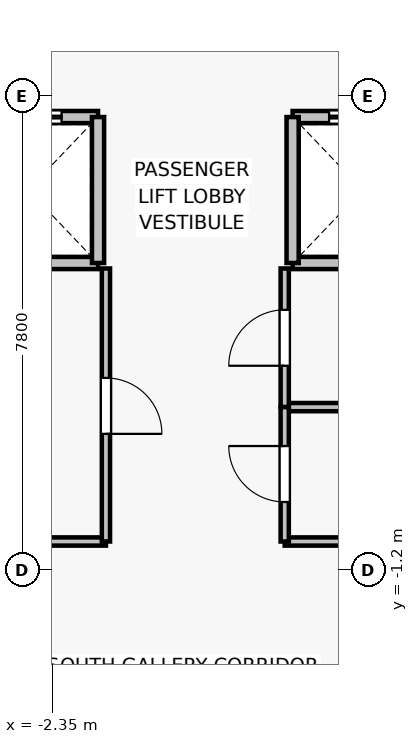
"""IFC4 building model, lengths in metres.
Left out: names, types, materials, properties, quantities, classifications, styles, units other than length and angle.
Written with IfcOpenShell. Run it as: python <this file> out.ifc"""

import sys

from ifc_helpers import new_model, si_unit, direction, frame, frame_2d, origin, place, context, subcontext, project, spatial, rectangle, extrude, source, transform, mapped, element, fill, save


model = new_model("IFC4")
c1 = context("Model", 3, precision=1e-05, world=origin(), true_north=direction((0.0, 1.0)))
c2 = subcontext(c1, "Body", "Model", "MODEL_VIEW")
j1 = project(units=[si_unit("LENGTHUNIT", "METRE"), si_unit("PLANEANGLEUNIT", "RADIAN")], contexts=[c1])
p1 = place(None, origin())
s1 = spatial("IfcSite", under=j1, at=p1, CompositionType="ELEMENT")
p2 = place(p1, origin())
s2 = spatial("IfcBuilding", under=s1, at=p2, CompositionType="ELEMENT")
p3 = place(p2, frame((0.0, 0.0, 189.1)))
s3 = spatial("IfcBuildingStorey", under=s2, at=p3, CompositionType="ELEMENT", Elevation=189.1)
p4 = place(p3, frame((-1.6, 3.85, 0.0), z_axis=(0.0, 0.0, 1.0), x_axis=(-1.0, 0.0, 0.0)))
e1 = element("IfcWall", 1, at=p4, inside=s3, PredefinedType="SOLIDWALL", context=c2, shape_type="SweptSolid", body=[
    extrude(rectangle(XDim=2.3, YDim=0.2, at=frame_2d((1.15, 0.0))), origin(), (0.0, 0.0, 1.0), 3.075),
])
p5 = place(p3, frame((-3.9, 6.25, 0.0), z_axis=(0.0, 0.0, 1.0), x_axis=(1.0, 0.0, 0.0)))
e2 = element("IfcWall", 2, at=p5, inside=s3, PredefinedType="SOLIDWALL", context=c2, shape_type="SweptSolid", body=[
    extrude(rectangle(XDim=2.3, YDim=0.2, at=frame_2d((1.15, 0.0))), origin(), (0.0, 0.0, 1.0), 3.075),
])
p6 = place(p5, frame((0.6, 0.0, 0.0)))
e3 = element("IfcOpeningElement", 3, at=p6, cuts=e2, PredefinedType="OPENING", context=c2, shape_type="SweptSolid", body=[
    extrude(rectangle(XDim=1.1, YDim=2.2, at=frame_2d((0.55, 1.1))), frame((0.0, 0.11, 0.0), z_axis=(0.0, -1.0, 0.0), x_axis=(1.0, 0.0, 0.0)), (0.0, 0.0, 1.0), 0.22),
])
p7 = place(p3, frame((-1.6, 6.25, 0.0), z_axis=(0.0, 0.0, 1.0), x_axis=(0.0, -1.0, 0.0)))
e4 = element("IfcWall", 4, at=p7, inside=s3, PredefinedType="SOLIDWALL", context=c2, shape_type="SweptSolid", body=[
    extrude(rectangle(XDim=2.4, YDim=0.2, at=frame_2d((1.2, 0.0))), origin(), (0.0, 0.0, 1.0), 3.075),
])
p8 = place(p3, frame((3.9, 3.85, 0.0), z_axis=(0.0, 0.0, 1.0), x_axis=(-1.0, 0.0, 0.0)))
e5 = element("IfcWall", 5, at=p8, inside=s3, PredefinedType="SOLIDWALL", context=c2, shape_type="SweptSolid", body=[
    extrude(rectangle(XDim=2.3, YDim=0.2, at=frame_2d((1.15, 0.0))), origin(), (0.0, 0.0, 1.0), 3.075),
])
p9 = place(p3, frame((1.6, 6.25, 0.0), z_axis=(0.0, 0.0, 1.0), x_axis=(1.0, 0.0, 0.0)))
e6 = element("IfcWall", 6, at=p9, inside=s3, PredefinedType="SOLIDWALL", context=c2, shape_type="SweptSolid", body=[
    extrude(rectangle(XDim=2.3, YDim=0.2, at=frame_2d((1.15, 0.0))), origin(), (0.0, 0.0, 1.0), 3.075),
])
p10 = place(p9, frame((0.6, 0.0, 0.0)))
e7 = element("IfcOpeningElement", 7, at=p10, cuts=e6, PredefinedType="OPENING", context=c2, shape_type="SweptSolid", body=[
    extrude(rectangle(XDim=1.1, YDim=2.2, at=frame_2d((0.55, 1.1))), frame((0.0, 0.11, 0.0), z_axis=(0.0, -1.0, 0.0), x_axis=(1.0, 0.0, 0.0)), (0.0, 0.0, 1.0), 0.22),
])
p11 = place(p3, frame((1.6, 3.85, 0.0), z_axis=(0.0, 0.0, 1.0), x_axis=(0.0, 1.0, 0.0)))
e8 = element("IfcWall", 8, at=p11, inside=s3, PredefinedType="SOLIDWALL", context=c2, shape_type="SweptSolid", body=[
    extrude(rectangle(XDim=2.4, YDim=0.2, at=frame_2d((1.2, 0.0))), origin(), (0.0, 0.0, 1.0), 3.075),
])
p12 = place(p3, frame((-1.47, -0.73, 0.0), z_axis=(0.0, 0.0, 1.0), x_axis=(-1.0, 0.0, 0.0)))
e9 = element("IfcWall", 9, at=p12, inside=s3, PredefinedType="PARTITIONING", context=c2, shape_type="SweptSolid", body=[
    extrude(rectangle(XDim=5.11, YDim=0.135, at=frame_2d((2.555, 0.0))), origin(), (0.0, 0.0, 1.0), 3.075),
])
p13 = place(p3, frame((-1.47, 3.76, 0.0), z_axis=(0.0, 0.0, 1.0), x_axis=(0.0, -1.0, 0.0)))
e10 = element("IfcWall", 10, at=p13, inside=s3, PredefinedType="PARTITIONING", context=c2, shape_type="SweptSolid", body=[
    extrude(rectangle(XDim=4.49, YDim=0.135, at=frame_2d((2.245, 0.0))), origin(), (0.0, 0.0, 1.0), 3.075),
])
p14 = place(p13, frame((1.8, 0.0, 0.0)))
e11 = element("IfcOpeningElement", 11, at=p14, cuts=e10, PredefinedType="OPENING", context=c2, shape_type="SweptSolid", body=[
    extrude(rectangle(XDim=0.92, YDim=2.1, at=frame_2d((0.46, 1.05))), frame((0.0, 0.077, 0.0), z_axis=(0.0, -1.0, 0.0), x_axis=(1.0, 0.0, 0.0)), (0.0, 0.0, 1.0), 0.155),
])
p15 = place(p3, frame((6.58, 1.48, 0.0), z_axis=(0.0, 0.0, 1.0), x_axis=(-1.0, 0.0, 0.0)))
e12 = element("IfcWall", 12, at=p15, inside=s3, PredefinedType="PARTITIONING", context=c2, shape_type="SweptSolid", body=[
    extrude(rectangle(XDim=5.11, YDim=0.135, at=frame_2d((2.555, 0.0))), origin(), (0.0, 0.0, 1.0), 3.075),
])
p16 = place(p3, frame((1.47, 1.48, 0.0), z_axis=(0.0, 0.0, 1.0), x_axis=(0.0, 1.0, 0.0)))
e13 = element("IfcWall", 13, at=p16, inside=s3, PredefinedType="PARTITIONING", context=c2, shape_type="SweptSolid", body=[
    extrude(rectangle(XDim=2.28, YDim=0.135, at=frame_2d((1.14, 0.0))), origin(), (0.0, 0.0, 1.0), 3.075),
])
p17 = place(p16, frame((0.68, 0.0, 0.0)))
e14 = element("IfcOpeningElement", 14, at=p17, cuts=e13, PredefinedType="OPENING", context=c2, shape_type="SweptSolid", body=[
    extrude(rectangle(XDim=0.92, YDim=2.1, at=frame_2d((0.46, 1.05))), frame((0.0, 0.077, 0.0), z_axis=(0.0, -1.0, 0.0), x_axis=(1.0, 0.0, 0.0)), (0.0, 0.0, 1.0), 0.155),
])
p18 = place(p3, frame((4.18, -0.73, 0.0), z_axis=(0.0, 0.0, 1.0), x_axis=(-1.0, 0.0, 0.0)))
e15 = element("IfcWall", 15, at=p18, inside=s3, PredefinedType="PARTITIONING", context=c2, shape_type="SweptSolid", body=[
    extrude(rectangle(XDim=2.71, YDim=0.135, at=frame_2d((1.355, 0.0))), origin(), (0.0, 0.0, 1.0), 3.075),
])
p19 = place(p3, frame((1.47, -0.73, 0.0), z_axis=(0.0, 0.0, 1.0), x_axis=(0.0, 1.0, 0.0)))
e16 = element("IfcWall", 16, at=p19, inside=s3, PredefinedType="PARTITIONING", context=c2, shape_type="SweptSolid", body=[
    extrude(rectangle(XDim=2.21, YDim=0.135, at=frame_2d((1.105, 0.0))), origin(), (0.0, 0.0, 1.0), 3.075),
])
p20 = place(p19, frame((0.65, 0.0, 0.0)))
e17 = element("IfcOpeningElement", 17, at=p20, cuts=e16, PredefinedType="OPENING", context=c2, shape_type="SweptSolid", body=[
    extrude(rectangle(XDim=0.92, YDim=2.1, at=frame_2d((0.46, 1.05))), frame((0.0, 0.077, 0.0), z_axis=(0.0, -1.0, 0.0), x_axis=(1.0, 0.0, 0.0)), (0.0, 0.0, 1.0), 0.155),
])
m1 = source(origin(), c2, "Body", "SweptSolid", [
    extrude(rectangle(XDim=1.1, YDim=2.2, at=frame_2d((0.55, 1.1))), frame((0.0, 0.025, 0.0), z_axis=(0.0, -1.0, 0.0), x_axis=(1.0, 0.0, 0.0)), (0.0, 0.0, 1.0), 0.05),
])
p21 = place(p6, origin())
e18 = element("IfcDoor", 18, at=p21, inside=s3, OperationType="DOUBLE_DOOR_SLIDING", PredefinedType="DOOR", context=c2, shape_type="MappedRepresentation", body=[
    mapped(m1, transform((0.0, 0.0, 0.0), x_axis=(1.0, 0.0, 0.0), y_axis=(0.0, 1.0, 0.0), z_axis=(0.0, 0.0, 1.0), scale=1.0)),
])
fill(e3, e18)
p22 = place(p10, origin())
e19 = element("IfcDoor", 19, at=p22, inside=s3, OperationType="DOUBLE_DOOR_SLIDING", PredefinedType="DOOR", context=c2, shape_type="MappedRepresentation", body=[
    mapped(m1, transform((0.0, 0.0, 0.0), x_axis=(1.0, 0.0, 0.0), y_axis=(0.0, 1.0, 0.0), z_axis=(0.0, 0.0, 1.0), scale=1.0)),
])
fill(e7, e19)
m2 = source(origin(), c2, "Body", "SweptSolid", [
    extrude(rectangle(XDim=0.92, YDim=2.1, at=frame_2d((0.46, 1.05))), frame((0.0, 0.025, 0.0), z_axis=(0.0, -1.0, 0.0), x_axis=(1.0, 0.0, 0.0)), (0.0, 0.0, 1.0), 0.05),
])
p23 = place(p14, origin())
e20 = element("IfcDoor", 20, at=p23, inside=s3, OperationType="SINGLE_SWING_RIGHT", PredefinedType="DOOR", context=c2, shape_type="MappedRepresentation", body=[
    mapped(m2, transform((0.0, 0.0, 0.0), x_axis=(1.0, 0.0, 0.0), y_axis=(0.0, 1.0, 0.0), z_axis=(0.0, 0.0, 1.0), scale=1.0)),
])
fill(e11, e20)
p24 = place(p17, origin())
e21 = element("IfcDoor", 21, at=p24, inside=s3, OperationType="SINGLE_SWING_LEFT", PredefinedType="DOOR", context=c2, shape_type="MappedRepresentation", body=[
    mapped(m2, transform((0.0, 0.0, 0.0), x_axis=(1.0, 0.0, 0.0), y_axis=(0.0, 1.0, 0.0), z_axis=(0.0, 0.0, 1.0), scale=1.0)),
])
fill(e14, e21)
p25 = place(p20, origin())
e22 = element("IfcDoor", 22, at=p25, inside=s3, OperationType="SINGLE_SWING_RIGHT", PredefinedType="DOOR", context=c2, shape_type="MappedRepresentation", body=[
    mapped(m2, transform((0.0, 0.0, 0.0), x_axis=(1.0, 0.0, 0.0), y_axis=(0.0, 1.0, 0.0), z_axis=(0.0, 0.0, 1.0), scale=1.0)),
])
fill(e17, e22)
save(model, sys.argv[1])
